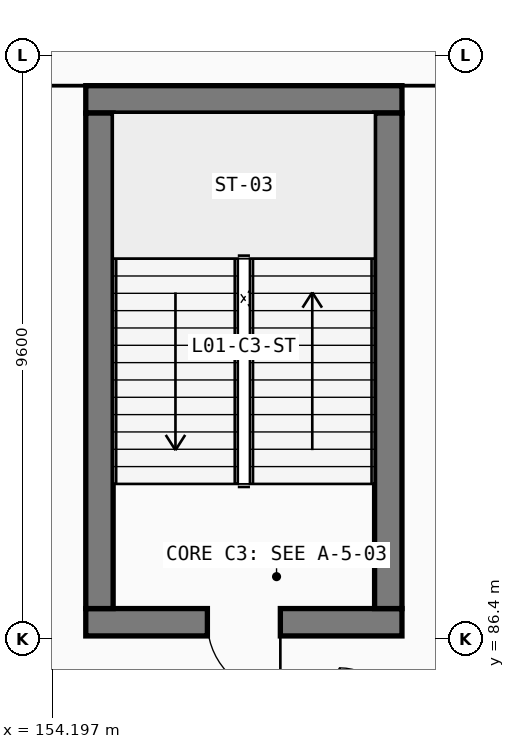
"""IFC4 building model, lengths in metres.
Left out: names, types, materials, properties, quantities, classifications, styles, units other than length and angle.
Written with IfcOpenShell. Run it as: python <this file> out.ifc"""

import sys

from ifc_helpers import new_model, si_unit, direction, frame, frame_2d, origin, place, context, subcontext, project, spatial, rectangle, extrude, element, fill, save


model = new_model("IFC4")
c1 = context("Model", 3, precision=1e-05, world=origin(), true_north=direction((0.0, 1.0)))
c2 = subcontext(c1, "Body", "Model", "MODEL_VIEW")
j1 = project(units=[si_unit("LENGTHUNIT", "METRE"), si_unit("PLANEANGLEUNIT", "RADIAN")], contexts=[c1])
p1 = place(None, origin())
s1 = spatial("IfcSite", under=j1, at=p1, CompositionType="ELEMENT")
p2 = place(p1, origin())
s2 = spatial("IfcBuilding", under=s1, at=p2, CompositionType="ELEMENT")
p3 = place(p2, frame((0.0, 0.0, 4.8)))
s3 = spatial("IfcBuildingStorey", under=s2, at=p3, CompositionType="ELEMENT", Elevation=4.8)
p4 = place(p3, frame((154.75, 86.675, 0.0), z_axis=(0.0, 0.0, 1.0), x_axis=(1.0, 0.0, 0.0)))
e1 = element("IfcWall", 1, at=p4, inside=s3, PredefinedType="SHEAR", context=c2, shape_type="SweptSolid", body=[
    extrude(rectangle(XDim=5.2, YDim=0.45, at=frame_2d((2.6, 0.0))), origin(), (0.0, 0.0, 1.0), 4.52),
])
p5 = place(p4, frame((3.2, 0.0, 0.0), z_axis=(0.0, 0.0, 1.0), x_axis=(-1.0, 0.0, 0.0)))
e2 = element("IfcOpeningElement", 2, at=p5, cuts=e1, PredefinedType="OPENING", context=c2, shape_type="SweptSolid", body=[
    extrude(rectangle(XDim=1.2, YDim=2.2, at=frame_2d((0.6, 1.1))), frame((0.0, 0.235, 0.0), z_axis=(0.0, -1.0, 0.0), x_axis=(1.0, 0.0, 0.0)), (0.0, 0.0, 1.0), 0.47),
])
p6 = place(p3, frame((159.95, 95.275, 0.0), z_axis=(0.0, 0.0, 1.0), x_axis=(-1.0, 0.0, 0.0)))
e3 = element("IfcWall", 3, at=p6, inside=s3, PredefinedType="SHEAR", context=c2, shape_type="SweptSolid", body=[
    extrude(rectangle(XDim=5.2, YDim=0.45, at=frame_2d((2.6, 0.0))), origin(), (0.0, 0.0, 1.0), 4.52),
])
for number, where, z_axis, x_axis in (
    (4, (154.975, 95.05, 0.0), (0.0, 0.0, 1.0), (0.0, -1.0, 0.0)),
    (5, (159.725, 86.9, 0.0), (0.0, 0.0, 1.0), (0.0, 1.0, 0.0)),
):
    element("IfcWall", number, at=place(p3, frame(where, z_axis=z_axis, x_axis=x_axis)), inside=s3, PredefinedType="SHEAR", context=c2, shape_type="SweptSolid", body=[
        extrude(rectangle(XDim=8.15, YDim=0.45, at=frame_2d((4.075, 0.0))), origin(), (0.0, 0.0, 1.0), 4.52),
    ])
p7 = place(p5, origin())
e6 = element("IfcDoor", 6, at=p7, inside=s3, OperationType="SINGLE_SWING_LEFT", PredefinedType="DOOR", context=c2, shape_type="SweptSolid", body=[
    extrude(rectangle(XDim=1.2, YDim=2.2, at=frame_2d((0.6, 1.1))), frame((0.0, 0.025, 0.0), z_axis=(0.0, -1.0, 0.0), x_axis=(1.0, 0.0, 0.0)), (0.0, 0.0, 1.0), 0.05),
])
fill(e2, e6)
save(model, sys.argv[1])
